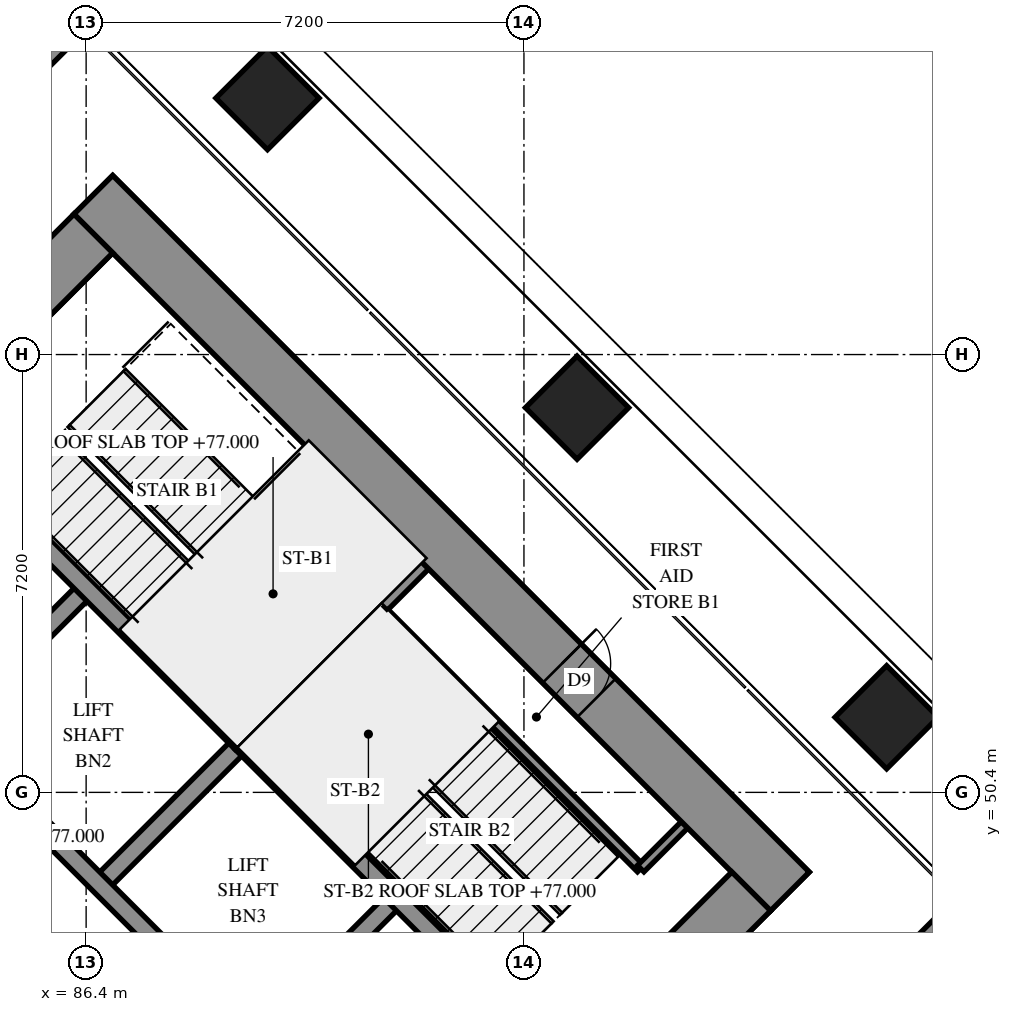
"""IFC4 building model, lengths in metres.
Left out: names, types, materials, properties, quantities, classifications, styles, units other than length and angle.
Written with IfcOpenShell. Run it as: python <this file> out.ifc"""

import sys

from ifc_helpers import new_model, si_unit, direction, frame, frame_2d, origin, origin_2d, place, context, subcontext, project, spatial, rectangle, extrude, element, fill, save


model = new_model("IFC4")
c1 = context("Model", 3, precision=1e-05, world=origin(), true_north=direction((0.0, 1.0)))
c2 = subcontext(c1, "Body", "Model", "MODEL_VIEW")
j1 = project(units=[si_unit("LENGTHUNIT", "METRE"), si_unit("PLANEANGLEUNIT", "RADIAN")], contexts=[c1])
p1 = place(None, origin())
s1 = spatial("IfcSite", under=j1, at=p1, CompositionType="ELEMENT")
p2 = place(p1, origin())
s2 = spatial("IfcBuilding", under=s1, at=p2, CompositionType="ELEMENT")
p3 = place(p2, frame((0.0, 0.0, 77.0)))
s3 = spatial("IfcBuildingStorey", under=s2, at=p3, CompositionType="ELEMENT", Elevation=77.0)
for number, where, z_axis, x_axis in (
    (1, (89.382, 61.818, 0.0), (0.0, 0.0, 1.0), (0.707, -0.707, 0.0)),
    (2, (94.474, 56.727, 0.0), (0.0, 0.0, 1.0), (0.707, -0.707, 0.0)),
    (3, (99.565, 51.635, 0.0), (0.0, 0.0, 1.0), (0.707, -0.707, 0.0)),
):
    element("IfcColumn", number, at=place(p3, frame(where, z_axis=z_axis, x_axis=x_axis)), inside=s3, PredefinedType="COLUMN", context=c2, shape_type="SweptSolid", body=[
        extrude(rectangle(XDim=1.2, YDim=1.2, at=origin_2d()), origin(), (0.0, 0.0, 1.0), 3.9),
    ])
p4 = place(p3, frame((75.7, 49.408, -0.3), z_axis=(0.0, 0.0, 1.0), x_axis=(0.7071098676, -0.7071036948, 0.0)))
e4 = element("IfcWall", 4, at=p4, inside=s3, PredefinedType="SHEAR", context=c2, shape_type="SweptSolid", body=[
    extrude(rectangle(XDim=16.2, YDim=0.9, at=frame_2d((8.1, 0.0))), origin(), (0.0, 0.0, 1.0), 3.5),
])
p5 = place(p3, frame((86.519, 60.227, -0.3), z_axis=(0.0, 0.0, 1.0), x_axis=(0.7071036948, -0.7071098676, 0.0)))
e5 = element("IfcWall", 5, at=p5, inside=s3, PredefinedType="SHEAR", context=c2, shape_type="SweptSolid", body=[
    extrude(rectangle(XDim=16.2, YDim=0.9, at=frame_2d((8.1, 0.0))), origin(), (0.0, 0.0, 1.0), 3.5),
])
p6 = place(p5, frame((10.9, 0.0, 0.3)))
e6 = element("IfcOpeningElement", 6, at=p6, cuts=e5, PredefinedType="OPENING", context=c2, shape_type="SweptSolid", body=[
    extrude(rectangle(XDim=0.8, YDim=2.1, at=frame_2d((0.4, 1.05))), frame((0.0, 0.46, 0.0), z_axis=(0.0, -1.0, 0.0), x_axis=(1.0, 0.0, 0.0)), (0.0, 0.0, 1.0), 0.92),
])
p7 = place(p3, frame((76.336, 49.408, -0.3), z_axis=(0.0, 0.0, 1.0), x_axis=(0.7071067812, 0.7071067812, 0.0)))
e7 = element("IfcWall", 7, at=p7, inside=s3, PredefinedType="SHEAR", context=c2, shape_type="SweptSolid", body=[
    extrude(rectangle(XDim=14.4, YDim=0.9, at=frame_2d((7.2, 0.0))), origin(), (0.0, 0.0, 1.0), 3.5),
])
p8 = place(p7, frame((4.55, 0.0, 0.3)))
e8 = element("IfcOpeningElement", 8, at=p8, cuts=e7, PredefinedType="OPENING", context=c2, shape_type="SweptSolid", body=[
    extrude(rectangle(XDim=1.1, YDim=2.1, at=frame_2d((0.55, 1.05))), frame((0.0, 0.46, 0.0), z_axis=(0.0, -1.0, 0.0), x_axis=(1.0, 0.0, 0.0)), (0.0, 0.0, 1.0), 0.92),
])
p9 = place(p7, frame((11.35, 0.0, 0.3)))
e9 = element("IfcOpeningElement", 9, at=p9, cuts=e7, PredefinedType="OPENING", context=c2, shape_type="SweptSolid", body=[
    extrude(rectangle(XDim=1.1, YDim=2.1, at=frame_2d((0.55, 1.05))), frame((0.0, 0.46, 0.0), z_axis=(0.0, -1.0, 0.0), x_axis=(1.0, 0.0, 0.0)), (0.0, 0.0, 1.0), 0.92),
])
p10 = place(p3, frame((87.155, 38.589, -0.3), z_axis=(0.0, 0.0, 1.0), x_axis=(0.7071067812, 0.7071067812, 0.0)))
e10 = element("IfcWall", 10, at=p10, inside=s3, PredefinedType="SHEAR", context=c2, shape_type="SweptSolid", body=[
    extrude(rectangle(XDim=14.4, YDim=0.9, at=frame_2d((7.2, 0.0))), origin(), (0.0, 0.0, 1.0), 3.5),
])
p11 = place(p10, frame((4.55, 0.0, 0.3)))
e11 = element("IfcOpeningElement", 11, at=p11, cuts=e10, PredefinedType="OPENING", context=c2, shape_type="SweptSolid", body=[
    extrude(rectangle(XDim=1.1, YDim=2.1, at=frame_2d((0.55, 1.05))), frame((0.0, 0.46, 0.0), z_axis=(0.0, -1.0, 0.0), x_axis=(1.0, 0.0, 0.0)), (0.0, 0.0, 1.0), 0.92),
])
p12 = place(p10, frame((11.35, 0.0, 0.3)))
e12 = element("IfcOpeningElement", 12, at=p12, cuts=e10, PredefinedType="OPENING", context=c2, shape_type="SweptSolid", body=[
    extrude(rectangle(XDim=1.1, YDim=2.1, at=frame_2d((0.55, 1.05))), frame((0.0, 0.46, 0.0), z_axis=(0.0, -1.0, 0.0), x_axis=(1.0, 0.0, 0.0)), (0.0, 0.0, 1.0), 0.92),
])
p13 = place(p3, frame((84.079, 51.423, 0.0), z_axis=(0.0, 0.0, 1.0), x_axis=(0.7071219326, 0.7070916295, 0.0)))
e13 = element("IfcWall", 13, at=p13, inside=s3, PredefinedType="SOLIDWALL", context=c2, shape_type="SweptSolid", body=[
    extrude(rectangle(XDim=3.3, YDim=0.3, at=frame_2d((1.65, 0.0))), origin(), (0.0, 0.0, 1.0), 3.9),
])
for number, where, z_axis, x_axis in (
    (14, (86.625, 48.878, 0.0), (0.0, 0.0, 1.0), (0.707, 0.707, 0.0)),
    (15, (89.17, 46.332, 0.0), (0.0, 0.0, 1.0), (0.707, 0.707, 0.0)),
):
    element("IfcWall", number, at=place(p3, frame(where, z_axis=z_axis, x_axis=x_axis)), inside=s3, PredefinedType="SOLIDWALL", context=c2, shape_type="SweptSolid", body=[
        extrude(rectangle(XDim=3.3, YDim=0.3, at=frame_2d((1.65, 0.0))), origin(), (0.0, 0.0, 1.0), 3.9),
    ])
p14 = place(p3, frame((78.988, 51.423, 0.0), z_axis=(0.0, 0.0, 1.0), x_axis=(0.7071067812, -0.7071067812, 0.0)))
e16 = element("IfcWall", 16, at=p14, inside=s3, PredefinedType="SOLIDWALL", context=c2, shape_type="SweptSolid", body=[
    extrude(rectangle(XDim=14.4, YDim=0.3, at=frame_2d((7.2, 0.0))), origin(), (0.0, 0.0, 1.0), 3.9),
])
p15 = place(p14, frame((1.25, 0.0, 0.0)))
e17 = element("IfcOpeningElement", 17, at=p15, cuts=e16, PredefinedType="OPENING", context=c2, shape_type="SweptSolid", body=[
    extrude(rectangle(XDim=1.1, YDim=2.1, at=frame_2d((0.55, 1.05))), frame((0.0, 0.16, 0.0), z_axis=(0.0, -1.0, 0.0), x_axis=(1.0, 0.0, 0.0)), (0.0, 0.0, 1.0), 0.32),
])
p16 = place(p14, frame((4.85, 0.0, 0.0)))
e18 = element("IfcOpeningElement", 18, at=p16, cuts=e16, PredefinedType="OPENING", context=c2, shape_type="SweptSolid", body=[
    extrude(rectangle(XDim=1.1, YDim=2.1, at=frame_2d((0.55, 1.05))), frame((0.0, 0.16, 0.0), z_axis=(0.0, -1.0, 0.0), x_axis=(1.0, 0.0, 0.0)), (0.0, 0.0, 1.0), 0.32),
])
p17 = place(p14, frame((8.45, 0.0, 0.0)))
e19 = element("IfcOpeningElement", 19, at=p17, cuts=e16, PredefinedType="OPENING", context=c2, shape_type="SweptSolid", body=[
    extrude(rectangle(XDim=1.1, YDim=2.1, at=frame_2d((0.55, 1.05))), frame((0.0, 0.16, 0.0), z_axis=(0.0, -1.0, 0.0), x_axis=(1.0, 0.0, 0.0)), (0.0, 0.0, 1.0), 0.32),
])
p18 = place(p14, frame((12.05, 0.0, 0.0)))
e20 = element("IfcOpeningElement", 20, at=p18, cuts=e16, PredefinedType="OPENING", context=c2, shape_type="SweptSolid", body=[
    extrude(rectangle(XDim=1.1, YDim=2.1, at=frame_2d((0.55, 1.05))), frame((0.0, 0.16, 0.0), z_axis=(0.0, -1.0, 0.0), x_axis=(1.0, 0.0, 0.0)), (0.0, 0.0, 1.0), 0.32),
])
p19 = place(p3, frame((81.534, 53.969, 0.0), z_axis=(0.0, 0.0, 1.0), x_axis=(0.707103309, -0.7071102534, 0.0)))
e21 = element("IfcWall", 21, at=p19, inside=s3, PredefinedType="SOLIDWALL", context=c2, shape_type="SweptSolid", body=[
    extrude(rectangle(XDim=14.4, YDim=0.3, at=frame_2d((7.2, 0.0))), origin(), (0.0, 0.0, 1.0), 3.9),
])
p20 = place(p19, frame((12.05, 0.0, 0.0)))
e22 = element("IfcOpeningElement", 22, at=p20, cuts=e21, PredefinedType="OPENING", context=c2, shape_type="SweptSolid", body=[
    extrude(rectangle(XDim=1.1, YDim=2.1, at=frame_2d((0.55, 1.05))), frame((0.0, 0.16, 0.0), z_axis=(0.0, -1.0, 0.0), x_axis=(1.0, 0.0, 0.0)), (0.0, 0.0, 1.0), 0.32),
])
for number, where, z_axis, x_axis in (
    (23, (83.867, 56.302, 0.0), (0.0, 0.0, 1.0), (0.707, -0.707, 0.0)),
    (24, (88.958, 51.211, 0.0), (0.0, 0.0, 1.0), (0.707, -0.707, 0.0)),
):
    element("IfcWall", number, at=place(p3, frame(where, z_axis=z_axis, x_axis=x_axis)), inside=s3, PredefinedType="SOLIDWALL", context=c2, shape_type="SweptSolid", body=[
        extrude(rectangle(XDim=7.2, YDim=0.3, at=frame_2d((3.6, 0.0))), origin(), (0.0, 0.0, 1.0), 3.9),
    ])
p21 = place(p3, frame((88.958, 51.211, 0.0), z_axis=(0.0, 0.0, 1.0), x_axis=(0.7071067812, 0.7071067812, 0.0)))
e25 = element("IfcWall", 25, at=p21, inside=s3, PredefinedType="SOLIDWALL", context=c2, shape_type="SweptSolid", body=[
    extrude(rectangle(XDim=4.2, YDim=0.3, at=frame_2d((2.1, 0.0))), origin(), (0.0, 0.0, 1.0), 3.9),
])
p22 = place(p3, frame((91.313, 53.354, 0.0), z_axis=(0.0, 0.0, 1.0), x_axis=(0.7071067812, -0.7071067812, 0.0)))
e26 = element("IfcWall", 26, at=p22, inside=s3, PredefinedType="PARTITIONING", context=c2, shape_type="SweptSolid", body=[
    extrude(rectangle(XDim=5.95, YDim=0.15, at=frame_2d((2.975, 0.0))), origin(), (0.0, 0.0, 1.0), 3.9),
])
p23 = place(p3, frame((95.52, 49.146, 0.0), z_axis=(0.0, 0.0, 1.0), x_axis=(0.7071067812, 0.7071067812, 0.0)))
e27 = element("IfcWall", 27, at=p23, inside=s3, PredefinedType="PARTITIONING", context=c2, shape_type="SweptSolid", body=[
    extrude(rectangle(XDim=1.02, YDim=0.15, at=frame_2d((0.51, 0.0))), origin(), (0.0, 0.0, 1.0), 3.9),
])
p24 = place(p3, frame((94.791, 42.621, 0.0), z_axis=(0.0, 0.0, 1.0), x_axis=(0.7071067812, 0.7071067812, 0.0)))
e28 = element("IfcWall", 28, at=p24, inside=s3, PredefinedType="PARTITIONING", context=c2, shape_type="SweptSolid", body=[
    extrude(rectangle(XDim=8.42, YDim=0.2, at=frame_2d((4.21, 0.0))), origin(), (0.0, 0.0, 1.0), 3.9),
])
p25 = place(p3, frame((81.051, 57.731, 0.0), z_axis=(0.0, 0.0, 1.0), x_axis=(0.7071067812, 0.7071067812, 0.0)))
e29 = element("IfcWall", 29, at=p25, inside=s3, PredefinedType="PARTITIONING", context=c2, shape_type="SweptSolid", body=[
    extrude(rectangle(XDim=7.45, YDim=0.2, at=frame_2d((3.725, 0.0))), origin(), (0.0, 0.0, 1.0), 3.9),
])
p26 = place(p25, frame((0.833, 0.0, 0.0)))
e30 = element("IfcOpeningElement", 30, at=p26, cuts=e29, PredefinedType="OPENING", context=c2, shape_type="SweptSolid", body=[
    extrude(rectangle(XDim=1.0, YDim=2.1, at=frame_2d((0.5, 1.05))), frame((0.0, 0.11, 0.0), z_axis=(0.0, -1.0, 0.0), x_axis=(1.0, 0.0, 0.0)), (0.0, 0.0, 1.0), 0.22),
])
p27 = place(p6, origin())
e31 = element("IfcDoor", 31, at=p27, inside=s3, OperationType="SINGLE_SWING_RIGHT", PredefinedType="DOOR", context=c2, shape_type="SweptSolid", body=[
    extrude(rectangle(XDim=0.8, YDim=2.1, at=frame_2d((0.4, 1.05))), frame((0.0, -0.39, 0.0), z_axis=(0.0, -1.0, 0.0), x_axis=(1.0, 0.0, 0.0)), (0.0, 0.0, 1.0), 0.05),
])
fill(e6, e31)
save(model, sys.argv[1])
